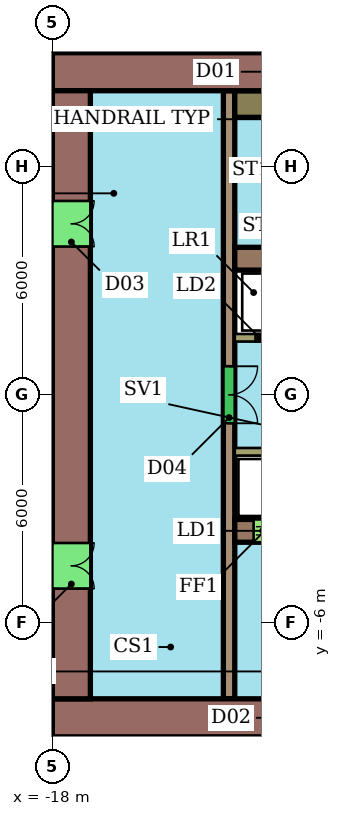
"""IFC4 building model, lengths in metres.
Left out: names, types, materials, properties, quantities, classifications, styles, units other than length and angle.
Written with IfcOpenShell. Run it as: python <this file> out.ifc"""

import sys

from ifc_helpers import new_model, si_unit, direction, frame, frame_2d, origin, place, context, subcontext, project, spatial, rectangle, extrude, element, fill, save


model = new_model("IFC4")
c1 = context("Model", 3, precision=1e-05, world=origin(), true_north=direction((0.0, 1.0)))
c2 = subcontext(c1, "Body", "Model", "MODEL_VIEW")
j1 = project(units=[si_unit("LENGTHUNIT", "METRE"), si_unit("PLANEANGLEUNIT", "RADIAN")], contexts=[c1])
p1 = place(None, origin())
s1 = spatial("IfcSite", under=j1, at=p1, CompositionType="ELEMENT")
p2 = place(p1, origin())
s2 = spatial("IfcBuilding", under=s1, at=p2, CompositionType="ELEMENT")
p3 = place(p2, frame((0.0, 0.0, 76.7)))
s3 = spatial("IfcBuildingStorey", under=s2, at=p3, CompositionType="ELEMENT", Elevation=76.7)
p4 = place(p3, frame((-6.0, 8.5, 0.0), z_axis=(0.0, 0.0, 1.0), x_axis=(-1.0, 0.0, 0.0)))
e1 = element("IfcWall", 1, at=p4, inside=s3, PredefinedType="SHEAR", context=c2, shape_type="SweptSolid", body=[
    extrude(rectangle(XDim=12.0, YDim=1.0, at=frame_2d((6.0, 0.0))), origin(), (0.0, 0.0, 1.0), 3.4),
])
p5 = place(p4, frame((5.2, 0.0, 0.0)))
e2 = element("IfcOpeningElement", 2, at=p5, cuts=e1, PredefinedType="OPENING", context=c2, shape_type="SweptSolid", body=[
    extrude(rectangle(XDim=1.2, YDim=2.1, at=frame_2d((0.6, 1.05))), frame((0.0, 0.51, 0.0), z_axis=(0.0, -1.0, 0.0), x_axis=(1.0, 0.0, 0.0)), (0.0, 0.0, 1.0), 1.02),
])
p6 = place(p3, frame((-18.0, -8.5, 0.0), z_axis=(0.0, 0.0, 1.0), x_axis=(1.0, 0.0, 0.0)))
e3 = element("IfcWall", 3, at=p6, inside=s3, PredefinedType="SHEAR", context=c2, shape_type="SweptSolid", body=[
    extrude(rectangle(XDim=24.0, YDim=1.0, at=frame_2d((12.0, 0.0))), origin(), (0.0, 0.0, 1.0), 3.4),
])
p7 = place(p6, frame((6.0, 0.0, 0.0)))
e4 = element("IfcOpeningElement", 4, at=p7, cuts=e3, PredefinedType="OPENING", context=c2, shape_type="SweptSolid", body=[
    extrude(rectangle(XDim=1.2, YDim=2.1, at=frame_2d((0.6, 1.05))), frame((0.0, 0.51, 0.0), z_axis=(0.0, -1.0, 0.0), x_axis=(1.0, 0.0, 0.0)), (0.0, 0.0, 1.0), 1.02),
])
p8 = place(p3, frame((-17.5, 8.0, 0.0), z_axis=(0.0, 0.0, 1.0), x_axis=(0.0, -1.0, 0.0)))
e5 = element("IfcWall", 5, at=p8, inside=s3, PredefinedType="SHEAR", context=c2, shape_type="SweptSolid", body=[
    extrude(rectangle(XDim=16.0, YDim=1.0, at=frame_2d((8.0, 0.0))), origin(), (0.0, 0.0, 1.0), 3.4),
])
p9 = place(p8, frame((11.9, 0.0, 0.0)))
e6 = element("IfcOpeningElement", 6, at=p9, cuts=e5, PredefinedType="OPENING", context=c2, shape_type="SweptSolid", body=[
    extrude(rectangle(XDim=1.2, YDim=2.1, at=frame_2d((0.6, 1.05))), frame((0.0, 0.51, 0.0), z_axis=(0.0, -1.0, 0.0), x_axis=(1.0, 0.0, 0.0)), (0.0, 0.0, 1.0), 1.02),
])
p10 = place(p8, frame((2.9, 0.0, 0.0)))
e7 = element("IfcOpeningElement", 7, at=p10, cuts=e5, PredefinedType="OPENING", context=c2, shape_type="SweptSolid", body=[
    extrude(rectangle(XDim=1.2, YDim=2.1, at=frame_2d((0.6, 1.05))), frame((0.0, 0.51, 0.0), z_axis=(0.0, -1.0, 0.0), x_axis=(1.0, 0.0, 0.0)), (0.0, 0.0, 1.0), 1.02),
])
p11 = place(p3, frame((-13.2, 3.58, 0.0), z_axis=(0.0, 0.0, 1.0), x_axis=(1.0, 0.0, 0.0)))
e8 = element("IfcWall", 8, at=p11, inside=s3, PredefinedType="SHEAR", context=c2, shape_type="SweptSolid", body=[
    extrude(rectangle(XDim=7.2, YDim=0.6, at=frame_2d((3.6, 0.0))), origin(), (0.0, 0.0, 1.0), 3.4),
])
p12 = place(p3, frame((-13.2, -3.58, 0.0), z_axis=(0.0, 0.0, 1.0), x_axis=(1.0, 0.0, 0.0)))
e9 = element("IfcWall", 9, at=p12, inside=s3, PredefinedType="SHEAR", context=c2, shape_type="SweptSolid", body=[
    extrude(rectangle(XDim=7.2, YDim=0.6, at=frame_2d((3.6, 0.0))), origin(), (0.0, 0.0, 1.0), 3.4),
])
p13 = place(p12, frame((0.496, 0.0, 0.0)))
e10 = element("IfcOpeningElement", 10, at=p13, cuts=e9, PredefinedType="OPENING", context=c2, shape_type="SweptSolid", body=[
    extrude(rectangle(XDim=1.2, YDim=2.1, at=frame_2d((0.6, 1.05))), frame((0.0, 0.31, 0.0), z_axis=(0.0, -1.0, 0.0), x_axis=(1.0, 0.0, 0.0)), (0.0, 0.0, 1.0), 0.62),
])
p14 = place(p12, frame((2.938, 0.0, 0.0)))
e11 = element("IfcOpeningElement", 11, at=p14, cuts=e9, PredefinedType="OPENING", context=c2, shape_type="SweptSolid", body=[
    extrude(rectangle(XDim=1.2, YDim=2.1, at=frame_2d((0.6, 1.05))), frame((0.0, 0.31, 0.0), z_axis=(0.0, -1.0, 0.0), x_axis=(1.0, 0.0, 0.0)), (0.0, 0.0, 1.0), 0.62),
])
p15 = place(p3, frame((-13.35, 8.0, 0.0), z_axis=(0.0, 0.0, 1.0), x_axis=(0.0, -1.0, 0.0)))
e12 = element("IfcWall", 12, at=p15, inside=s3, PredefinedType="SHEAR", context=c2, shape_type="SweptSolid", body=[
    extrude(rectangle(XDim=16.0, YDim=0.3, at=frame_2d((8.0, 0.0))), origin(), (0.0, 0.0, 1.0), 3.4),
])
p16 = place(p15, frame((7.25, 0.0, 0.0)))
e13 = element("IfcOpeningElement", 13, at=p16, cuts=e12, PredefinedType="OPENING", context=c2, shape_type="SweptSolid", body=[
    extrude(rectangle(XDim=1.5, YDim=2.1, at=frame_2d((0.75, 1.05))), frame((0.0, 0.16, 0.0), z_axis=(0.0, -1.0, 0.0), x_axis=(1.0, 0.0, 0.0)), (0.0, 0.0, 1.0), 0.32),
])
p17 = place(p3, frame((-13.2, 1.5, 0.0), z_axis=(0.0, 0.0, 1.0), x_axis=(1.0, 0.0, 0.0)))
e14 = element("IfcWall", 14, at=p17, inside=s3, PredefinedType="SHEAR", context=c2, shape_type="SweptSolid", body=[
    extrude(rectangle(XDim=14.4, YDim=0.2, at=frame_2d((7.2, 0.0))), origin(), (0.0, 0.0, 1.0), 3.4),
])
p18 = place(p17, frame((0.546, 0.0, 0.0)))
e15 = element("IfcOpeningElement", 15, at=p18, cuts=e14, PredefinedType="OPENING", context=c2, shape_type="SweptSolid", body=[
    extrude(rectangle(XDim=1.1, YDim=2.1, at=frame_2d((0.55, 1.05))), frame((0.0, 0.11, 0.0), z_axis=(0.0, -1.0, 0.0), x_axis=(1.0, 0.0, 0.0)), (0.0, 0.0, 1.0), 0.22),
])
p19 = place(p17, frame((2.988, 0.0, 0.0)))
e16 = element("IfcOpeningElement", 16, at=p19, cuts=e14, PredefinedType="OPENING", context=c2, shape_type="SweptSolid", body=[
    extrude(rectangle(XDim=1.1, YDim=2.1, at=frame_2d((0.55, 1.05))), frame((0.0, 0.11, 0.0), z_axis=(0.0, -1.0, 0.0), x_axis=(1.0, 0.0, 0.0)), (0.0, 0.0, 1.0), 0.22),
])
p20 = place(p17, frame((5.429, 0.0, 0.0)))
e17 = element("IfcOpeningElement", 17, at=p20, cuts=e14, PredefinedType="OPENING", context=c2, shape_type="SweptSolid", body=[
    extrude(rectangle(XDim=1.1, YDim=2.1, at=frame_2d((0.55, 1.05))), frame((0.0, 0.11, 0.0), z_axis=(0.0, -1.0, 0.0), x_axis=(1.0, 0.0, 0.0)), (0.0, 0.0, 1.0), 0.22),
])
p21 = place(p17, frame((7.871, 0.0, 0.0)))
e18 = element("IfcOpeningElement", 18, at=p21, cuts=e14, PredefinedType="OPENING", context=c2, shape_type="SweptSolid", body=[
    extrude(rectangle(XDim=1.1, YDim=2.1, at=frame_2d((0.55, 1.05))), frame((0.0, 0.11, 0.0), z_axis=(0.0, -1.0, 0.0), x_axis=(1.0, 0.0, 0.0)), (0.0, 0.0, 1.0), 0.22),
])
p22 = place(p17, frame((13.35, 0.0, 0.0)))
e19 = element("IfcOpeningElement", 19, at=p22, cuts=e14, PredefinedType="OPENING", context=c2, shape_type="SweptSolid", body=[
    extrude(rectangle(XDim=0.9, YDim=2.1, at=frame_2d((0.45, 1.05))), frame((0.0, 0.11, 0.0), z_axis=(0.0, -1.0, 0.0), x_axis=(1.0, 0.0, 0.0)), (0.0, 0.0, 1.0), 0.22),
])
p23 = place(p3, frame((1.2, -1.5, 0.0), z_axis=(0.0, 0.0, 1.0), x_axis=(-1.0, 0.0, 0.0)))
e20 = element("IfcWall", 20, at=p23, inside=s3, PredefinedType="SHEAR", context=c2, shape_type="SweptSolid", body=[
    extrude(rectangle(XDim=14.4, YDim=0.2, at=frame_2d((7.2, 0.0))), origin(), (0.0, 0.0, 1.0), 3.4),
])
p24 = place(p23, frame((7.821, 0.0, 0.0)))
e21 = element("IfcOpeningElement", 21, at=p24, cuts=e20, PredefinedType="OPENING", context=c2, shape_type="SweptSolid", body=[
    extrude(rectangle(XDim=1.2, YDim=2.1, at=frame_2d((0.6, 1.05))), frame((0.0, 0.11, 0.0), z_axis=(0.0, -1.0, 0.0), x_axis=(1.0, 0.0, 0.0)), (0.0, 0.0, 1.0), 0.22),
])
p25 = place(p23, frame((0.15, 0.0, 0.0)))
e22 = element("IfcOpeningElement", 22, at=p25, cuts=e20, PredefinedType="OPENING", context=c2, shape_type="SweptSolid", body=[
    extrude(rectangle(XDim=0.9, YDim=2.1, at=frame_2d((0.45, 1.05))), frame((0.0, 0.11, 0.0), z_axis=(0.0, -1.0, 0.0), x_axis=(1.0, 0.0, 0.0)), (0.0, 0.0, 1.0), 0.22),
])
p26 = place(p3, frame((-13.2, 7.65, 0.0), z_axis=(0.0, 0.0, 1.0), x_axis=(1.0, 0.0, 0.0)))
e23 = element("IfcWall", 23, at=p26, inside=s3, PredefinedType="SHEAR", context=c2, shape_type="SweptSolid", body=[
    extrude(rectangle(XDim=0.8, YDim=0.7, at=frame_2d((0.4, 0.0))), origin(), (0.0, 0.0, 1.0), 3.4),
])
p27 = place(p9, origin())
e24 = element("IfcDoor", 24, at=p27, inside=s3, OperationType="DOUBLE_DOOR_SINGLE_SWING", PredefinedType="NOTDEFINED", context=c2, shape_type="SweptSolid", body=[
    extrude(rectangle(XDim=1.2, YDim=2.1, at=frame_2d((0.6, 1.05))), frame((0.0, 0.025, 0.0), z_axis=(0.0, -1.0, 0.0), x_axis=(1.0, 0.0, 0.0)), (0.0, 0.0, 1.0), 0.05),
])
fill(e6, e24)
p28 = place(p10, origin())
e25 = element("IfcDoor", 25, at=p28, inside=s3, OperationType="DOUBLE_DOOR_SINGLE_SWING", PredefinedType="NOTDEFINED", context=c2, shape_type="SweptSolid", body=[
    extrude(rectangle(XDim=1.2, YDim=2.1, at=frame_2d((0.6, 1.05))), frame((0.0, 0.025, 0.0), z_axis=(0.0, -1.0, 0.0), x_axis=(1.0, 0.0, 0.0)), (0.0, 0.0, 1.0), 0.05),
])
fill(e7, e25)
p29 = place(p13, origin())
e26 = element("IfcDoor", 26, at=p29, inside=s3, OperationType="DOUBLE_DOOR_SLIDING", PredefinedType="NOTDEFINED", context=c2, shape_type="SweptSolid", body=[
    extrude(rectangle(XDim=1.2, YDim=2.1, at=frame_2d((0.6, 1.05))), frame((0.0, 0.025, 0.0), z_axis=(0.0, -1.0, 0.0), x_axis=(1.0, 0.0, 0.0)), (0.0, 0.0, 1.0), 0.05),
])
fill(e10, e26)
p30 = place(p16, origin())
e27 = element("IfcDoor", 27, at=p30, inside=s3, OperationType="DOUBLE_DOOR_SINGLE_SWING", PredefinedType="NOTDEFINED", context=c2, shape_type="SweptSolid", body=[
    extrude(rectangle(XDim=1.5, YDim=2.1, at=frame_2d((0.75, 1.05))), frame((0.0, 0.025, 0.0), z_axis=(0.0, -1.0, 0.0), x_axis=(1.0, 0.0, 0.0)), (0.0, 0.0, 1.0), 0.05),
])
fill(e13, e27)
p31 = place(p18, origin())
e28 = element("IfcDoor", 28, at=p31, inside=s3, OperationType="DOUBLE_DOOR_SLIDING", PredefinedType="NOTDEFINED", context=c2, shape_type="SweptSolid", body=[
    extrude(rectangle(XDim=1.1, YDim=2.1, at=frame_2d((0.55, 1.05))), frame((0.0, 0.025, 0.0), z_axis=(0.0, -1.0, 0.0), x_axis=(1.0, 0.0, 0.0)), (0.0, 0.0, 1.0), 0.05),
])
fill(e15, e28)
save(model, sys.argv[1])
